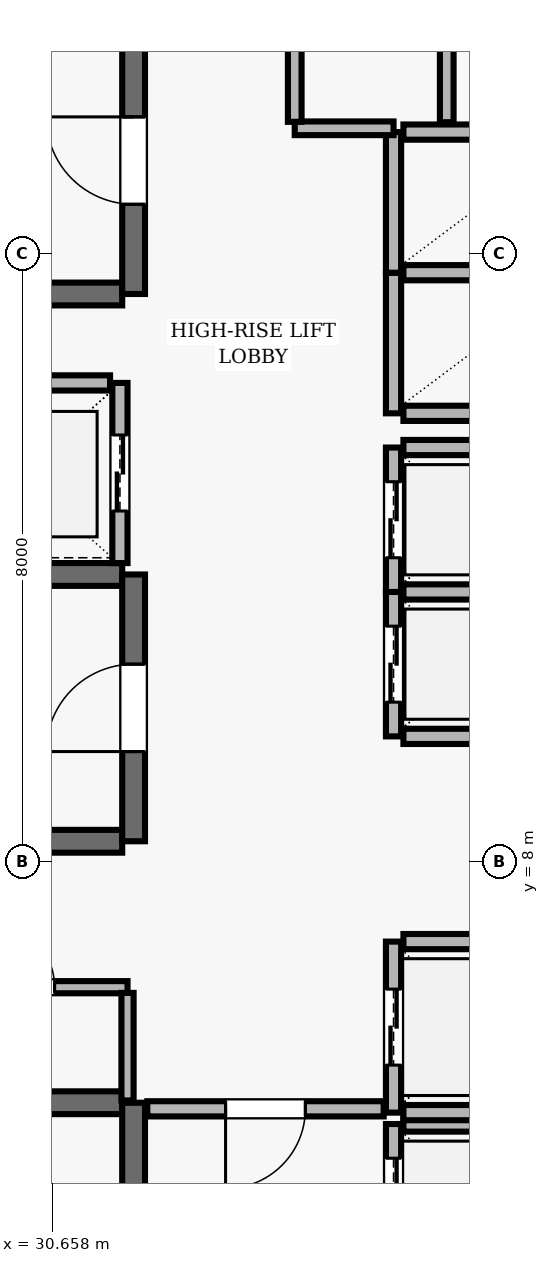
"""IFC4 building model, lengths in metres.
Left out: names, types, materials, properties, quantities, classifications, styles, units other than length and angle.
Written with IfcOpenShell. Run it as: python <this file> out.ifc"""

import sys

from ifc_helpers import new_model, si_unit, direction, frame, frame_2d, origin, place, context, subcontext, project, spatial, rectangle, extrude, element, fill, save


model = new_model("IFC4")
c1 = context("Model", 3, precision=1e-05, world=origin(), true_north=direction((0.0, 1.0)))
c2 = subcontext(c1, "Body", "Model", "MODEL_VIEW")
j1 = project(units=[si_unit("LENGTHUNIT", "METRE"), si_unit("PLANEANGLEUNIT", "RADIAN")], contexts=[c1])
p1 = place(None, origin())
s1 = spatial("IfcSite", under=j1, at=p1, CompositionType="ELEMENT")
p2 = place(p1, origin())
s2 = spatial("IfcBuilding", under=s1, at=p2, CompositionType="ELEMENT")
p3 = place(p2, frame((0.0, 0.0, 275.5)))
s3 = spatial("IfcBuildingStorey", under=s2, at=p3, CompositionType="ELEMENT", Elevation=275.5)
p4 = place(p3, frame((31.58, 4.83, 0.0), z_axis=(0.0, 0.0, 1.0), x_axis=(-1.0, 0.0, 0.0)))
e1 = element("IfcWall", 1, at=p4, inside=s3, PredefinedType="SHEAR", context=c2, shape_type="SweptSolid", body=[
    extrude(rectangle(XDim=8.36, YDim=0.3, at=frame_2d((4.18, 0.0))), origin(), (0.0, 0.0, 1.0), 3.69),
])
p5 = place(p3, frame((31.73, 0.96, 0.0), z_axis=(0.0, 0.0, 1.0), x_axis=(0.0, 1.0, 0.0)))
e2 = element("IfcWall", 2, at=p5, inside=s3, PredefinedType="SHEAR", context=c2, shape_type="SweptSolid", body=[
    extrude(rectangle(XDim=3.87, YDim=0.3, at=frame_2d((1.935, 0.0))), origin(), (0.0, 0.0, 1.0), 3.69),
])
p6 = place(p5, frame((1.54, 0.0, 0.0)))
e3 = element("IfcOpeningElement", 3, at=p6, cuts=e2, PredefinedType="OPENING", context=c2, shape_type="SweptSolid", body=[
    extrude(rectangle(XDim=1.15, YDim=2.15, at=frame_2d((0.575, 1.075))), frame((0.0, 0.16, 0.0), z_axis=(0.0, -1.0, 0.0), x_axis=(1.0, 0.0, 0.0)), (0.0, 0.0, 1.0), 0.32),
])
p7 = place(p3, frame((23.22, 15.47, 0.0), z_axis=(0.0, 0.0, 1.0), x_axis=(1.0, 0.0, 0.0)))
e4 = element("IfcWall", 4, at=p7, inside=s3, PredefinedType="SHEAR", context=c2, shape_type="SweptSolid", body=[
    extrude(rectangle(XDim=8.36, YDim=0.3, at=frame_2d((4.18, 0.0))), origin(), (0.0, 0.0, 1.0), 3.69),
])
p8 = place(p3, frame((31.73, 15.47, 0.0), z_axis=(0.0, 0.0, 1.0), x_axis=(0.0, 1.0, 0.0)))
e5 = element("IfcWall", 5, at=p8, inside=s3, PredefinedType="SHEAR", context=c2, shape_type="SweptSolid", body=[
    extrude(rectangle(XDim=3.51, YDim=0.3, at=frame_2d((1.755, 0.0))), origin(), (0.0, 0.0, 1.0), 3.69),
])
p9 = place(p8, frame((1.18, 0.0, 0.0)))
e6 = element("IfcOpeningElement", 6, at=p9, cuts=e5, PredefinedType="OPENING", context=c2, shape_type="SweptSolid", body=[
    extrude(rectangle(XDim=1.15, YDim=2.15, at=frame_2d((0.575, 1.075))), frame((0.0, 0.16, 0.0), z_axis=(0.0, -1.0, 0.0), x_axis=(1.0, 0.0, 0.0)), (0.0, 0.0, 1.0), 0.32),
])
for number, where, z_axis, x_axis in (
    (7, (31.58, 11.78, 0.0), (0.0, 0.0, 1.0), (-1.0, 0.0, 0.0)),
    (8, (23.22, 8.27, 0.0), (0.0, 0.0, 1.0), (1.0, 0.0, 0.0)),
):
    element("IfcWall", number, at=place(p3, frame(where, z_axis=z_axis, x_axis=x_axis)), inside=s3, PredefinedType="SHEAR", context=c2, shape_type="SweptSolid", body=[
        extrude(rectangle(XDim=8.36, YDim=0.3, at=frame_2d((4.18, 0.0))), origin(), (0.0, 0.0, 1.0), 3.69),
    ])
p10 = place(p3, frame((31.73, 8.27, 0.0), z_axis=(0.0, 0.0, 1.0), x_axis=(0.0, 1.0, 0.0)))
e9 = element("IfcWall", 9, at=p10, inside=s3, PredefinedType="SHEAR", context=c2, shape_type="SweptSolid", body=[
    extrude(rectangle(XDim=3.51, YDim=0.3, at=frame_2d((1.755, 0.0))), origin(), (0.0, 0.0, 1.0), 3.69),
])
p11 = place(p10, frame((1.18, 0.0, 0.0)))
e10 = element("IfcOpeningElement", 10, at=p11, cuts=e9, PredefinedType="OPENING", context=c2, shape_type="SweptSolid", body=[
    extrude(rectangle(XDim=1.15, YDim=2.15, at=frame_2d((0.575, 1.075))), frame((0.0, 0.16, 0.0), z_axis=(0.0, -1.0, 0.0), x_axis=(1.0, 0.0, 0.0)), (0.0, 0.0, 1.0), 0.32),
])
p12 = place(p3, frame((35.15, 4.55, 0.0), z_axis=(0.0, 0.0, 1.0), x_axis=(0.0, -1.0, 0.0)))
e11 = element("IfcWall", 11, at=p12, inside=s3, PredefinedType="SOLIDWALL", context=c2, shape_type="SweptSolid", body=[
    extrude(rectangle(XDim=2.1, YDim=0.2, at=frame_2d((1.05, 0.0))), origin(), (0.0, 0.0, 1.0), 3.69),
])
p13 = place(p12, frame((0.45, 0.0, 0.0)))
e12 = element("IfcOpeningElement", 12, at=p13, cuts=e11, PredefinedType="OPENING", context=c2, shape_type="SweptSolid", body=[
    extrude(rectangle(XDim=1.2, YDim=2.15, at=frame_2d((0.6, 1.075))), frame((0.0, 0.11, 0.0), z_axis=(0.0, -1.0, 0.0), x_axis=(1.0, 0.0, 0.0)), (0.0, 0.0, 1.0), 0.22),
])
p14 = place(p3, frame((37.42, 4.55, 0.0), z_axis=(0.0, 0.0, 1.0), x_axis=(-1.0, 0.0, 0.0)))
e13 = element("IfcWall", 13, at=p14, inside=s3, PredefinedType="SOLIDWALL", context=c2, shape_type="SweptSolid", body=[
    extrude(rectangle(XDim=2.14, YDim=0.2, at=frame_2d((1.07, 0.0))), origin(), (0.0, 0.0, 1.0), 3.69),
])
p15 = place(p3, frame((35.15, 6.95, 0.0), z_axis=(0.0, 0.0, 1.0), x_axis=(0.0, -1.0, 0.0)))
e14 = element("IfcWall", 14, at=p15, inside=s3, PredefinedType="SOLIDWALL", context=c2, shape_type="SweptSolid", body=[
    extrude(rectangle(XDim=2.25, YDim=0.2, at=frame_2d((1.125, 0.0))), origin(), (0.0, 0.0, 1.0), 3.69),
])
p16 = place(p15, frame((0.625, 0.0, 0.0)))
e15 = element("IfcOpeningElement", 15, at=p16, cuts=e14, PredefinedType="OPENING", context=c2, shape_type="SweptSolid", body=[
    extrude(rectangle(XDim=1.0, YDim=2.1, at=frame_2d((0.5, 1.05))), frame((0.0, 0.11, 0.0), z_axis=(0.0, -1.0, 0.0), x_axis=(1.0, 0.0, 0.0)), (0.0, 0.0, 1.0), 0.22),
])
for number, where, z_axis, x_axis in (
    (16, (35.28, 4.7, 0.0), (0.0, 0.0, 1.0), (1.0, 0.0, 0.0)),
    (17, (37.42, 6.95, 0.0), (0.0, 0.0, 1.0), (-1.0, 0.0, 0.0)),
):
    element("IfcWall", number, at=place(p3, frame(where, z_axis=z_axis, x_axis=x_axis)), inside=s3, PredefinedType="SOLIDWALL", context=c2, shape_type="SweptSolid", body=[
        extrude(rectangle(XDim=2.14, YDim=0.2, at=frame_2d((1.07, 0.0))), origin(), (0.0, 0.0, 1.0), 3.69),
    ])
p17 = place(p3, frame((35.15, 11.55, 0.0), z_axis=(0.0, 0.0, 1.0), x_axis=(0.0, -1.0, 0.0)))
e18 = element("IfcWall", 18, at=p17, inside=s3, PredefinedType="SOLIDWALL", context=c2, shape_type="SweptSolid", body=[
    extrude(rectangle(XDim=1.9, YDim=0.2, at=frame_2d((0.95, 0.0))), origin(), (0.0, 0.0, 1.0), 3.69),
])
p18 = place(p17, frame((0.45, 0.0, 0.0)))
e19 = element("IfcOpeningElement", 19, at=p18, cuts=e18, PredefinedType="OPENING", context=c2, shape_type="SweptSolid", body=[
    extrude(rectangle(XDim=1.0, YDim=2.1, at=frame_2d((0.5, 1.05))), frame((0.0, 0.11, 0.0), z_axis=(0.0, -1.0, 0.0), x_axis=(1.0, 0.0, 0.0)), (0.0, 0.0, 1.0), 0.22),
])
for number, where, z_axis, x_axis in (
    (20, (35.28, 9.65, 0.0), (0.0, 0.0, 1.0), (1.0, 0.0, 0.0)),
    (21, (37.42, 11.55, 0.0), (0.0, 0.0, 1.0), (-1.0, 0.0, 0.0)),
):
    element("IfcWall", number, at=place(p3, frame(where, z_axis=z_axis, x_axis=x_axis)), inside=s3, PredefinedType="SOLIDWALL", context=c2, shape_type="SweptSolid", body=[
        extrude(rectangle(XDim=2.14, YDim=0.2, at=frame_2d((1.07, 0.0))), origin(), (0.0, 0.0, 1.0), 3.69),
    ])
p19 = place(p3, frame((35.15, 13.45, 0.0), z_axis=(0.0, 0.0, 1.0), x_axis=(0.0, -1.0, 0.0)))
e22 = element("IfcWall", 22, at=p19, inside=s3, PredefinedType="SOLIDWALL", context=c2, shape_type="SweptSolid", body=[
    extrude(rectangle(XDim=1.9, YDim=0.2, at=frame_2d((0.95, 0.0))), origin(), (0.0, 0.0, 1.0), 3.69),
])
p20 = place(p19, frame((0.45, 0.0, 0.0)))
e23 = element("IfcOpeningElement", 23, at=p20, cuts=e22, PredefinedType="OPENING", context=c2, shape_type="SweptSolid", body=[
    extrude(rectangle(XDim=1.0, YDim=2.1, at=frame_2d((0.5, 1.05))), frame((0.0, 0.11, 0.0), z_axis=(0.0, -1.0, 0.0), x_axis=(1.0, 0.0, 0.0)), (0.0, 0.0, 1.0), 0.22),
])
p21 = place(p3, frame((37.42, 13.45, 0.0), z_axis=(0.0, 0.0, 1.0), x_axis=(-1.0, 0.0, 0.0)))
e24 = element("IfcWall", 24, at=p21, inside=s3, PredefinedType="SOLIDWALL", context=c2, shape_type="SweptSolid", body=[
    extrude(rectangle(XDim=2.14, YDim=0.2, at=frame_2d((1.07, 0.0))), origin(), (0.0, 0.0, 1.0), 3.69),
])
p22 = place(p3, frame((31.55, 11.93, 0.0), z_axis=(0.0, 0.0, 1.0), x_axis=(0.0, 1.0, 0.0)))
e25 = element("IfcWall", 25, at=p22, inside=s3, PredefinedType="SOLIDWALL", context=c2, shape_type="SweptSolid", body=[
    extrude(rectangle(XDim=2.37, YDim=0.2, at=frame_2d((1.185, 0.0))), origin(), (0.0, 0.0, 1.0), 3.69),
])
p23 = place(p22, frame((0.685, 0.0, 0.0)))
e26 = element("IfcOpeningElement", 26, at=p23, cuts=e25, PredefinedType="OPENING", context=c2, shape_type="SweptSolid", body=[
    extrude(rectangle(XDim=1.0, YDim=2.1, at=frame_2d((0.5, 1.05))), frame((0.0, 0.11, 0.0), z_axis=(0.0, -1.0, 0.0), x_axis=(1.0, 0.0, 0.0)), (0.0, 0.0, 1.0), 0.22),
])
p24 = place(p3, frame((31.42, 14.3, 0.0), z_axis=(0.0, 0.0, 1.0), x_axis=(-1.0, 0.0, 0.0)))
e27 = element("IfcWall", 27, at=p24, inside=s3, PredefinedType="SOLIDWALL", context=c2, shape_type="SweptSolid", body=[
    extrude(rectangle(XDim=2.44, YDim=0.2, at=frame_2d((1.22, 0.0))), origin(), (0.0, 0.0, 1.0), 3.69),
])
p25 = place(p3, frame((35.15, 15.75, 0.0), z_axis=(0.0, 0.0, 1.0), x_axis=(0.0, -1.0, 0.0)))
e28 = element("IfcWall", 28, at=p25, inside=s3, PredefinedType="SOLIDWALL", context=c2, shape_type="SweptSolid", body=[
    extrude(rectangle(XDim=1.85, YDim=0.2, at=frame_2d((0.925, 0.0))), origin(), (0.0, 0.0, 1.0), 3.69),
])
for number, where, z_axis, x_axis in (
    (29, (35.28, 13.9, 0.0), (0.0, 0.0, 1.0), (1.0, 0.0, 0.0)),
    (30, (37.42, 15.75, 0.0), (0.0, 0.0, 1.0), (-1.0, 0.0, 0.0)),
):
    element("IfcWall", number, at=place(p3, frame(where, z_axis=z_axis, x_axis=x_axis)), inside=s3, PredefinedType="SOLIDWALL", context=c2, shape_type="SweptSolid", body=[
        extrude(rectangle(XDim=2.14, YDim=0.2, at=frame_2d((1.07, 0.0))), origin(), (0.0, 0.0, 1.0), 3.69),
    ])
p26 = place(p3, frame((35.15, 17.6, 0.0), z_axis=(0.0, 0.0, 1.0), x_axis=(0.0, -1.0, 0.0)))
e31 = element("IfcWall", 31, at=p26, inside=s3, PredefinedType="SOLIDWALL", context=c2, shape_type="SweptSolid", body=[
    extrude(rectangle(XDim=1.85, YDim=0.2, at=frame_2d((0.925, 0.0))), origin(), (0.0, 0.0, 1.0), 3.69),
])
p27 = place(p3, frame((37.42, 17.6, 0.0), z_axis=(0.0, 0.0, 1.0), x_axis=(-1.0, 0.0, 0.0)))
e32 = element("IfcWall", 32, at=p27, inside=s3, PredefinedType="SOLIDWALL", context=c2, shape_type="SweptSolid", body=[
    extrude(rectangle(XDim=2.14, YDim=0.2, at=frame_2d((1.07, 0.0))), origin(), (0.0, 0.0, 1.0), 3.69),
])
p28 = place(p3, frame((28.85, 6.35, 0.0), z_axis=(0.0, 0.0, 1.0), x_axis=(1.0, 0.0, 0.0)))
e33 = element("IfcWall", 33, at=p28, inside=s3, PredefinedType="PARTITIONING", context=c2, shape_type="SweptSolid", body=[
    extrude(rectangle(XDim=2.8, YDim=0.16, at=frame_2d((1.4, 0.0))), origin(), (0.0, 0.0, 1.0), 3.69),
])
p29 = place(p28, frame((0.96, 0.0, 0.0)))
e34 = element("IfcOpeningElement", 34, at=p29, cuts=e33, PredefinedType="OPENING", context=c2, shape_type="SweptSolid", body=[
    extrude(rectangle(XDim=0.88, YDim=2.1, at=frame_2d((0.44, 1.05))), frame((0.0, 0.09, 0.0), z_axis=(0.0, -1.0, 0.0), x_axis=(1.0, 0.0, 0.0)), (0.0, 0.0, 1.0), 0.18),
])
p30 = place(p3, frame((33.85, 17.65, 0.0), z_axis=(0.0, 0.0, 1.0), x_axis=(1.0, 0.0, 0.0)))
e35 = element("IfcWall", 35, at=p30, inside=s3, PredefinedType="PARTITIONING", context=c2, shape_type="SweptSolid", body=[
    extrude(rectangle(XDim=1.3, YDim=0.18, at=frame_2d((0.65, 0.0))), origin(), (0.0, 0.0, 1.0), 3.69),
])
p31 = place(p3, frame((35.02, 4.75, 0.0), z_axis=(0.0, 0.0, 1.0), x_axis=(-1.0, 0.0, 0.0)))
e36 = element("IfcWall", 36, at=p31, inside=s3, PredefinedType="SOLIDWALL", context=c2, shape_type="SweptSolid", body=[
    extrude(rectangle(XDim=3.11, YDim=0.2, at=frame_2d((1.555, 0.0))), origin(), (0.0, 0.0, 1.0), 3.69),
])
p32 = place(p31, frame((1.03, 0.0, 0.0)))
e37 = element("IfcOpeningElement", 37, at=p32, cuts=e36, PredefinedType="OPENING", context=c2, shape_type="SweptSolid", body=[
    extrude(rectangle(XDim=1.05, YDim=2.15, at=frame_2d((0.525, 1.075))), frame((0.0, 0.11, 0.0), z_axis=(0.0, -1.0, 0.0), x_axis=(1.0, 0.0, 0.0)), (0.0, 0.0, 1.0), 0.22),
])
p33 = place(p3, frame((31.65, 4.86, 0.0), z_axis=(0.0, 0.0, 1.0), x_axis=(0.0, 1.0, 0.0)))
e38 = element("IfcWall", 38, at=p33, inside=s3, PredefinedType="PARTITIONING", context=c2, shape_type="SweptSolid", body=[
    extrude(rectangle(XDim=1.415, YDim=0.16, at=frame_2d((0.708, 0.0))), origin(), (0.0, 0.0, 1.0), 3.69),
])
p34 = place(p3, frame((33.85, 17.735, 0.0), z_axis=(0.0, 0.0, 1.0), x_axis=(0.0, 1.0, 0.0)))
e39 = element("IfcWall", 39, at=p34, inside=s3, PredefinedType="PARTITIONING", context=c2, shape_type="SweptSolid", body=[
    extrude(rectangle(XDim=6.03, YDim=0.18, at=frame_2d((3.015, 0.0))), origin(), (0.0, 0.0, 1.0), 3.69),
])
p35 = place(p34, frame((2.54, 0.0, 0.0)))
e40 = element("IfcOpeningElement", 40, at=p35, cuts=e39, PredefinedType="OPENING", context=c2, shape_type="SweptSolid", body=[
    extrude(rectangle(XDim=0.95, YDim=2.1, at=frame_2d((0.475, 1.05))), frame((0.0, 0.1, 0.0), z_axis=(0.0, -1.0, 0.0), x_axis=(1.0, 0.0, 0.0)), (0.0, 0.0, 1.0), 0.2),
])
p36 = place(p3, frame((35.85, 17.73, 0.0), z_axis=(0.0, 0.0, 1.0), x_axis=(0.0, 1.0, 0.0)))
e41 = element("IfcWall", 41, at=p36, inside=s3, PredefinedType="PARTITIONING", context=c2, shape_type="SweptSolid", body=[
    extrude(rectangle(XDim=3.412, YDim=0.18, at=frame_2d((1.706, 0.0))), origin(), (0.0, 0.0, 1.0), 3.69),
])
p37 = place(p36, frame((1.256, 0.0, 0.0)))
e42 = element("IfcOpeningElement", 42, at=p37, cuts=e41, PredefinedType="OPENING", context=c2, shape_type="SweptSolid", body=[
    extrude(rectangle(XDim=0.9, YDim=2.1, at=frame_2d((0.45, 1.05))), frame((0.0, 0.1, 0.0), z_axis=(0.0, -1.0, 0.0), x_axis=(1.0, 0.0, 0.0)), (0.0, 0.0, 1.0), 0.2),
])
p38 = place(p9, origin())
e43 = element("IfcDoor", 43, at=p38, inside=s3, OperationType="SINGLE_SWING_RIGHT", PredefinedType="DOOR", context=c2, shape_type="SweptSolid", body=[
    extrude(rectangle(XDim=1.15, YDim=2.15, at=frame_2d((0.575, 1.075))), frame((0.0, 0.025, 0.0), z_axis=(0.0, -1.0, 0.0), x_axis=(1.0, 0.0, 0.0)), (0.0, 0.0, 1.0), 0.05),
])
fill(e6, e43)
p39 = place(p11, origin())
e44 = element("IfcDoor", 44, at=p39, inside=s3, OperationType="SINGLE_SWING_LEFT", PredefinedType="DOOR", context=c2, shape_type="SweptSolid", body=[
    extrude(rectangle(XDim=1.15, YDim=2.15, at=frame_2d((0.575, 1.075))), frame((0.0, 0.025, 0.0), z_axis=(0.0, -1.0, 0.0), x_axis=(1.0, 0.0, 0.0)), (0.0, 0.0, 1.0), 0.05),
])
fill(e10, e44)
p40 = place(p13, origin())
e45 = element("IfcDoor", 45, at=p40, inside=s3, OperationType="DOUBLE_DOOR_SLIDING", PredefinedType="DOOR", context=c2, shape_type="SweptSolid", body=[
    extrude(rectangle(XDim=1.2, YDim=2.15, at=frame_2d((0.6, 1.075))), frame((0.0, 0.025, 0.0), z_axis=(0.0, -1.0, 0.0), x_axis=(1.0, 0.0, 0.0)), (0.0, 0.0, 1.0), 0.05),
])
fill(e12, e45)
p41 = place(p16, origin())
e46 = element("IfcDoor", 46, at=p41, inside=s3, OperationType="DOUBLE_DOOR_SLIDING", PredefinedType="DOOR", context=c2, shape_type="SweptSolid", body=[
    extrude(rectangle(XDim=1.0, YDim=2.1, at=frame_2d((0.5, 1.05))), frame((0.0, 0.025, 0.0), z_axis=(0.0, -1.0, 0.0), x_axis=(1.0, 0.0, 0.0)), (0.0, 0.0, 1.0), 0.05),
])
fill(e15, e46)
p42 = place(p18, origin())
e47 = element("IfcDoor", 47, at=p42, inside=s3, OperationType="DOUBLE_DOOR_SLIDING", PredefinedType="DOOR", context=c2, shape_type="SweptSolid", body=[
    extrude(rectangle(XDim=1.0, YDim=2.1, at=frame_2d((0.5, 1.05))), frame((0.0, 0.025, 0.0), z_axis=(0.0, -1.0, 0.0), x_axis=(1.0, 0.0, 0.0)), (0.0, 0.0, 1.0), 0.05),
])
fill(e19, e47)
p43 = place(p20, origin())
e48 = element("IfcDoor", 48, at=p43, inside=s3, OperationType="DOUBLE_DOOR_SLIDING", PredefinedType="DOOR", context=c2, shape_type="SweptSolid", body=[
    extrude(rectangle(XDim=1.0, YDim=2.1, at=frame_2d((0.5, 1.05))), frame((0.0, 0.025, 0.0), z_axis=(0.0, -1.0, 0.0), x_axis=(1.0, 0.0, 0.0)), (0.0, 0.0, 1.0), 0.05),
])
fill(e23, e48)
p44 = place(p23, origin())
e49 = element("IfcDoor", 49, at=p44, inside=s3, OperationType="DOUBLE_DOOR_SLIDING", PredefinedType="DOOR", context=c2, shape_type="SweptSolid", body=[
    extrude(rectangle(XDim=1.0, YDim=2.1, at=frame_2d((0.5, 1.05))), frame((0.0, 0.025, 0.0), z_axis=(0.0, -1.0, 0.0), x_axis=(1.0, 0.0, 0.0)), (0.0, 0.0, 1.0), 0.05),
])
fill(e26, e49)
p45 = place(p32, origin())
e50 = element("IfcDoor", 50, at=p45, inside=s3, OperationType="SINGLE_SWING_RIGHT", PredefinedType="DOOR", context=c2, shape_type="SweptSolid", body=[
    extrude(rectangle(XDim=1.05, YDim=2.15, at=frame_2d((0.525, 1.075))), frame((0.0, 0.025, 0.0), z_axis=(0.0, -1.0, 0.0), x_axis=(1.0, 0.0, 0.0)), (0.0, 0.0, 1.0), 0.05),
])
fill(e37, e50)
p46 = place(p29, origin())
e51 = element("IfcDoor", 51, at=p46, inside=s3, OperationType="SINGLE_SWING_LEFT", PredefinedType="DOOR", context=c2, shape_type="SweptSolid", body=[
    extrude(rectangle(XDim=0.88, YDim=2.1, at=frame_2d((0.44, 1.05))), frame((0.0, 0.025, 0.0), z_axis=(0.0, -1.0, 0.0), x_axis=(1.0, 0.0, 0.0)), (0.0, 0.0, 1.0), 0.05),
])
fill(e34, e51)
save(model, sys.argv[1])
